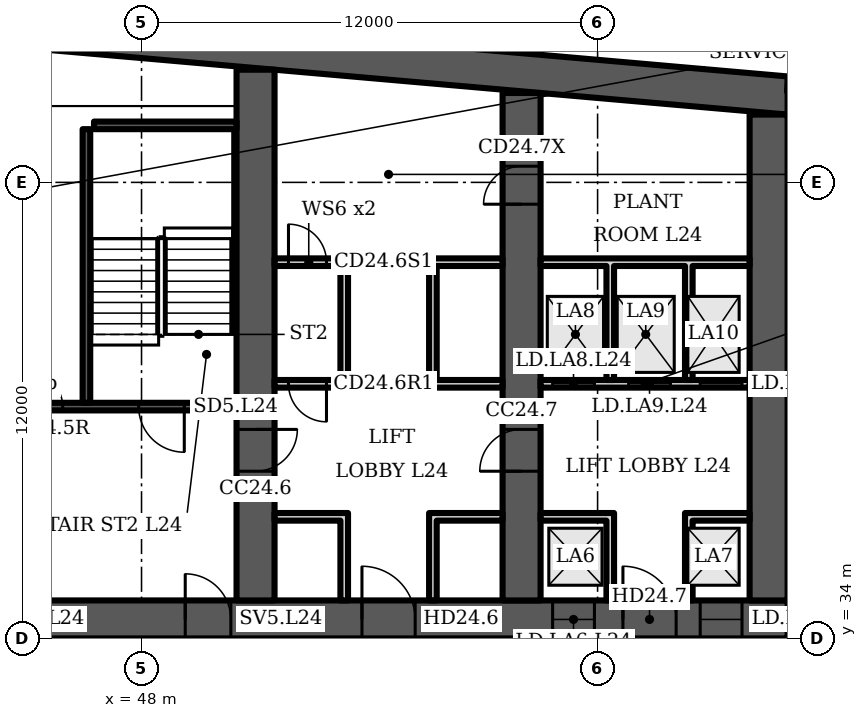
"""IFC4 building model, lengths in metres.
Left out: names, types, materials, properties, quantities, classifications, styles, units other than length and angle.
Written with IfcOpenShell. Run it as: python <this file> out.ifc"""

import sys

from ifc_helpers import new_model, si_unit, direction, frame, frame_2d, origin, place, context, subcontext, project, spatial, polyline, rectangle, outline, extrude, element, fill, save


model = new_model("IFC4")
c1 = context("Model", 3, precision=1e-05, world=origin(), true_north=direction((0.0, 1.0)))
c2 = subcontext(c1, "Body", "Model", "MODEL_VIEW")
j1 = project(units=[si_unit("LENGTHUNIT", "METRE"), si_unit("PLANEANGLEUNIT", "RADIAN")], contexts=[c1])
p1 = place(None, origin())
s1 = spatial("IfcSite", under=j1, at=p1, CompositionType="ELEMENT")
p2 = place(p1, origin())
s2 = spatial("IfcBuilding", under=s1, at=p2, CompositionType="ELEMENT")
p3 = place(p2, frame((0.0, 0.0, 107.5)))
s3 = spatial("IfcBuildingStorey", under=s2, at=p3, CompositionType="ELEMENT", Elevation=107.5)
p4 = place(p3, origin())
e1 = element("IfcWall", 1, at=p4, inside=s3, PredefinedType="SHEAR", context=c2, shape_type="SweptSolid", body=[
    extrude(outline(polyline([(16.0, 47.784), (40.5, 49.927), (65.0, 47.784), (65.0, 48.787), (40.5, 50.931), (16.0, 48.787), (16.0, 47.784)])), origin(), (0.0, 0.0, 1.0), 3.6),
])
p5 = place(p3, frame((16.0, 34.5, 0.0), z_axis=(0.0, 0.0, 1.0), x_axis=(1.0, 0.0, 0.0)))
e2 = element("IfcWall", 2, at=p5, inside=s3, PredefinedType="SHEAR", context=c2, shape_type="SweptSolid", body=[
    extrude(rectangle(XDim=49.0, YDim=1.0, at=frame_2d((24.5, 0.0))), origin(), (0.0, 0.0, 1.0), 3.6),
])
p6 = place(p5, frame((1.2, 0.0, 0.0)))
e3 = element("IfcOpeningElement", 3, at=p6, cuts=e2, PredefinedType="OPENING", context=c2, shape_type="SweptSolid", body=[
    extrude(rectangle(XDim=1.1, YDim=2.1, at=frame_2d((0.55, 1.05))), frame((0.0, 0.51, 0.0), z_axis=(0.0, -1.0, 0.0), x_axis=(1.0, 0.0, 0.0)), (0.0, 0.0, 1.0), 1.02),
])
p7 = place(p5, frame((5.083, 0.0, 0.0)))
e4 = element("IfcOpeningElement", 4, at=p7, cuts=e2, PredefinedType="OPENING", context=c2, shape_type="SweptSolid", body=[
    extrude(rectangle(XDim=1.1, YDim=2.1, at=frame_2d((0.55, 1.05))), frame((0.0, 0.51, 0.0), z_axis=(0.0, -1.0, 0.0), x_axis=(1.0, 0.0, 0.0)), (0.0, 0.0, 1.0), 1.02),
])
p8 = place(p5, frame((2.933, 0.0, 0.0)))
e5 = element("IfcOpeningElement", 5, at=p8, cuts=e2, PredefinedType="OPENING", context=c2, shape_type="SweptSolid", body=[
    extrude(rectangle(XDim=1.4, YDim=2.1, at=frame_2d((0.7, 1.05))), frame((0.0, 0.51, 0.0), z_axis=(0.0, -1.0, 0.0), x_axis=(1.0, 0.0, 0.0)), (0.0, 0.0, 1.0), 1.02),
])
p9 = place(p5, frame((7.65, 0.0, 0.0)))
e6 = element("IfcOpeningElement", 6, at=p9, cuts=e2, PredefinedType="OPENING", context=c2, shape_type="SweptSolid", body=[
    extrude(rectangle(XDim=1.2, YDim=2.1, at=frame_2d((0.6, 1.05))), frame((0.0, 0.51, 0.0), z_axis=(0.0, -1.0, 0.0), x_axis=(1.0, 0.0, 0.0)), (0.0, 0.0, 1.0), 1.02),
])
p10 = place(p5, frame((14.817, 0.0, 0.0)))
e7 = element("IfcOpeningElement", 7, at=p10, cuts=e2, PredefinedType="OPENING", context=c2, shape_type="SweptSolid", body=[
    extrude(rectangle(XDim=1.1, YDim=2.1, at=frame_2d((0.55, 1.05))), frame((0.0, 0.51, 0.0), z_axis=(0.0, -1.0, 0.0), x_axis=(1.0, 0.0, 0.0)), (0.0, 0.0, 1.0), 1.02),
])
p11 = place(p5, frame((19.083, 0.0, 0.0)))
e8 = element("IfcOpeningElement", 8, at=p11, cuts=e2, PredefinedType="OPENING", context=c2, shape_type="SweptSolid", body=[
    extrude(rectangle(XDim=1.1, YDim=2.1, at=frame_2d((0.55, 1.05))), frame((0.0, 0.51, 0.0), z_axis=(0.0, -1.0, 0.0), x_axis=(1.0, 0.0, 0.0)), (0.0, 0.0, 1.0), 1.02),
])
p12 = place(p5, frame((16.8, 0.0, 0.0)))
e9 = element("IfcOpeningElement", 9, at=p12, cuts=e2, PredefinedType="OPENING", context=c2, shape_type="SweptSolid", body=[
    extrude(rectangle(XDim=1.4, YDim=2.1, at=frame_2d((0.7, 1.05))), frame((0.0, 0.51, 0.0), z_axis=(0.0, -1.0, 0.0), x_axis=(1.0, 0.0, 0.0)), (0.0, 0.0, 1.0), 1.02),
])
p13 = place(p5, frame((21.817, 0.0, 0.0)))
e10 = element("IfcOpeningElement", 10, at=p13, cuts=e2, PredefinedType="OPENING", context=c2, shape_type="SweptSolid", body=[
    extrude(rectangle(XDim=1.1, YDim=2.1, at=frame_2d((0.55, 1.05))), frame((0.0, 0.51, 0.0), z_axis=(0.0, -1.0, 0.0), x_axis=(1.0, 0.0, 0.0)), (0.0, 0.0, 1.0), 1.02),
])
p14 = place(p5, frame((26.083, 0.0, 0.0)))
e11 = element("IfcOpeningElement", 11, at=p14, cuts=e2, PredefinedType="OPENING", context=c2, shape_type="SweptSolid", body=[
    extrude(rectangle(XDim=1.1, YDim=2.1, at=frame_2d((0.55, 1.05))), frame((0.0, 0.51, 0.0), z_axis=(0.0, -1.0, 0.0), x_axis=(1.0, 0.0, 0.0)), (0.0, 0.0, 1.0), 1.02),
])
p15 = place(p5, frame((33.15, 0.0, 0.0)))
e12 = element("IfcOpeningElement", 12, at=p15, cuts=e2, PredefinedType="OPENING", context=c2, shape_type="SweptSolid", body=[
    extrude(rectangle(XDim=1.2, YDim=2.1, at=frame_2d((0.6, 1.05))), frame((0.0, 0.51, 0.0), z_axis=(0.0, -1.0, 0.0), x_axis=(1.0, 0.0, 0.0)), (0.0, 0.0, 1.0), 1.02),
])
p16 = place(p5, frame((37.8, 0.0, 0.0)))
e13 = element("IfcOpeningElement", 13, at=p16, cuts=e2, PredefinedType="OPENING", context=c2, shape_type="SweptSolid", body=[
    extrude(rectangle(XDim=1.4, YDim=2.1, at=frame_2d((0.7, 1.05))), frame((0.0, 0.51, 0.0), z_axis=(0.0, -1.0, 0.0), x_axis=(1.0, 0.0, 0.0)), (0.0, 0.0, 1.0), 1.02),
])
p17 = place(p5, frame((42.817, 0.0, 0.0)))
e14 = element("IfcOpeningElement", 14, at=p17, cuts=e2, PredefinedType="OPENING", context=c2, shape_type="SweptSolid", body=[
    extrude(rectangle(XDim=1.1, YDim=2.1, at=frame_2d((0.55, 1.05))), frame((0.0, 0.51, 0.0), z_axis=(0.0, -1.0, 0.0), x_axis=(1.0, 0.0, 0.0)), (0.0, 0.0, 1.0), 1.02),
])
p18 = place(p5, frame((46.7, 0.0, 0.0)))
e15 = element("IfcOpeningElement", 15, at=p18, cuts=e2, PredefinedType="OPENING", context=c2, shape_type="SweptSolid", body=[
    extrude(rectangle(XDim=1.1, YDim=2.1, at=frame_2d((0.55, 1.05))), frame((0.0, 0.51, 0.0), z_axis=(0.0, -1.0, 0.0), x_axis=(1.0, 0.0, 0.0)), (0.0, 0.0, 1.0), 1.02),
])
p19 = place(p5, frame((44.667, 0.0, 0.0)))
e16 = element("IfcOpeningElement", 16, at=p19, cuts=e2, PredefinedType="OPENING", context=c2, shape_type="SweptSolid", body=[
    extrude(rectangle(XDim=1.4, YDim=2.1, at=frame_2d((0.7, 1.05))), frame((0.0, 0.51, 0.0), z_axis=(0.0, -1.0, 0.0), x_axis=(1.0, 0.0, 0.0)), (0.0, 0.0, 1.0), 1.02),
])
p20 = place(p3, frame((51.0, 35.0, 0.0), z_axis=(0.0, 0.0, 1.0), x_axis=(0.0, 1.0, 0.0)))
e17 = element("IfcWall", 17, at=p20, inside=s3, PredefinedType="SHEAR", context=c2, shape_type="SweptSolid", body=[
    extrude(rectangle(XDim=13.965, YDim=1.0, at=frame_2d((6.982, 0.0))), origin(), (0.0, 0.0, 1.0), 3.6),
])
p21 = place(p20, frame((3.4, 0.0, 0.0)))
e18 = element("IfcOpeningElement", 18, at=p21, cuts=e17, PredefinedType="OPENING", context=c2, shape_type="SweptSolid", body=[
    extrude(rectangle(XDim=1.1, YDim=2.1, at=frame_2d((0.55, 1.05))), frame((0.0, 0.51, 0.0), z_axis=(0.0, -1.0, 0.0), x_axis=(1.0, 0.0, 0.0)), (0.0, 0.0, 1.0), 1.02),
])
p22 = place(p3, frame((58.0, 35.0, 0.0), z_axis=(0.0, 0.0, 1.0), x_axis=(0.0, 1.0, 0.0)))
e19 = element("IfcWall", 19, at=p22, inside=s3, PredefinedType="SHEAR", context=c2, shape_type="SweptSolid", body=[
    extrude(rectangle(XDim=13.352, YDim=1.0, at=frame_2d((6.676, 0.0))), origin(), (0.0, 0.0, 1.0), 3.6),
])
p23 = place(p22, frame((10.426, 0.0, 0.0)))
e20 = element("IfcOpeningElement", 20, at=p23, cuts=e19, PredefinedType="OPENING", context=c2, shape_type="SweptSolid", body=[
    extrude(rectangle(XDim=1.0, YDim=2.1, at=frame_2d((0.5, 1.05))), frame((0.0, 0.51, 0.0), z_axis=(0.0, -1.0, 0.0), x_axis=(1.0, 0.0, 0.0)), (0.0, 0.0, 1.0), 1.02),
])
p24 = place(p22, frame((3.4, 0.0, 0.0)))
e21 = element("IfcOpeningElement", 21, at=p24, cuts=e19, PredefinedType="OPENING", context=c2, shape_type="SweptSolid", body=[
    extrude(rectangle(XDim=1.1, YDim=2.1, at=frame_2d((0.55, 1.05))), frame((0.0, 0.51, 0.0), z_axis=(0.0, -1.0, 0.0), x_axis=(1.0, 0.0, 0.0)), (0.0, 0.0, 1.0), 1.02),
])
p25 = place(p3, frame((64.5, 35.0, 0.0), z_axis=(0.0, 0.0, 1.0), x_axis=(0.0, 1.0, 0.0)))
e22 = element("IfcWall", 22, at=p25, inside=s3, PredefinedType="SHEAR", context=c2, shape_type="SweptSolid", body=[
    extrude(rectangle(XDim=12.784, YDim=1.0, at=frame_2d((6.392, 0.0))), origin(), (0.0, 0.0, 1.0), 3.6),
])
p26 = place(p3, frame((67.983, 48.326, 0.0), z_axis=(0.0, 0.0, 1.0), x_axis=(-0.996194, 0.087168, 0.0)))
e23 = element("IfcWall", 23, at=p26, inside=s3, PredefinedType="SOLIDWALL", context=c2, shape_type="SweptSolid", body=[
    extrude(rectangle(XDim=2.994, YDim=0.4, at=frame_2d((1.497, 0.0))), origin(), (0.0, 0.0, 1.0), 3.2),
])
p27 = place(p3, frame((44.5, 40.1, 0.0), z_axis=(0.0, 0.0, 1.0), x_axis=(1.0, 0.0, 0.0)))
e24 = element("IfcWall", 24, at=p27, inside=s3, PredefinedType="SHEAR", context=c2, shape_type="SweptSolid", body=[
    extrude(rectangle(XDim=6.0, YDim=0.2, at=frame_2d((3.0, 0.0))), origin(), (0.0, 0.0, 1.0), 3.2),
])
p28 = place(p27, frame((3.425, 0.0, 0.0)))
e25 = element("IfcOpeningElement", 25, at=p28, cuts=e24, PredefinedType="OPENING", context=c2, shape_type="SweptSolid", body=[
    extrude(rectangle(XDim=1.2, YDim=2.1, at=frame_2d((0.6, 1.05))), frame((0.0, 0.11, 0.0), z_axis=(0.0, -1.0, 0.0), x_axis=(1.0, 0.0, 0.0)), (0.0, 0.0, 1.0), 0.22),
])
p29 = place(p27, frame((0.525, 0.0, 0.0)))
e26 = element("IfcOpeningElement", 26, at=p29, cuts=e24, PredefinedType="OPENING", context=c2, shape_type="SweptSolid", body=[
    extrude(rectangle(XDim=0.9, YDim=2.1, at=frame_2d((0.45, 1.05))), frame((0.0, 0.11, 0.0), z_axis=(0.0, -1.0, 0.0), x_axis=(1.0, 0.0, 0.0)), (0.0, 0.0, 1.0), 0.22),
])
p30 = place(p3, frame((46.55, 40.2, 0.0), z_axis=(0.0, 0.0, 1.0), x_axis=(0.0, 1.0, 0.0)))
e27 = element("IfcWall", 27, at=p30, inside=s3, PredefinedType="SHEAR", context=c2, shape_type="SweptSolid", body=[
    extrude(rectangle(XDim=7.2, YDim=0.2, at=frame_2d((3.6, 0.0))), origin(), (0.0, 0.0, 1.0), 3.2),
])
p31 = place(p3, frame((46.75, 47.5, 0.0), z_axis=(0.0, 0.0, 1.0), x_axis=(1.0, 0.0, 0.0)))
e28 = element("IfcWall", 28, at=p31, inside=s3, PredefinedType="SHEAR", context=c2, shape_type="SweptSolid", body=[
    extrude(rectangle(XDim=3.75, YDim=0.2, at=frame_2d((1.875, 0.0))), origin(), (0.0, 0.0, 1.0), 3.2),
])
p32 = place(p3, frame((51.5, 40.7, 0.0), z_axis=(0.0, 0.0, 1.0), x_axis=(1.0, 0.0, 0.0)))
e29 = element("IfcWall", 29, at=p32, inside=s3, PredefinedType="PARTITIONING", context=c2, shape_type="SweptSolid", body=[
    extrude(rectangle(XDim=6.0, YDim=0.2, at=frame_2d((3.0, 0.0))), origin(), (0.0, 0.0, 1.0), 3.2),
])
p33 = place(p32, frame((0.367, 0.0, 0.0)))
e30 = element("IfcOpeningElement", 30, at=p33, cuts=e29, PredefinedType="OPENING", context=c2, shape_type="SweptSolid", body=[
    extrude(rectangle(XDim=1.0, YDim=2.1, at=frame_2d((0.5, 1.05))), frame((0.0, 0.11, 0.0), z_axis=(0.0, -1.0, 0.0), x_axis=(1.0, 0.0, 0.0)), (0.0, 0.0, 1.0), 0.22),
])
p34 = place(p3, frame((51.5, 43.9, 0.0), z_axis=(0.0, 0.0, 1.0), x_axis=(1.0, 0.0, 0.0)))
e31 = element("IfcWall", 31, at=p34, inside=s3, PredefinedType="PARTITIONING", context=c2, shape_type="SweptSolid", body=[
    extrude(rectangle(XDim=6.0, YDim=0.2, at=frame_2d((3.0, 0.0))), origin(), (0.0, 0.0, 1.0), 3.2),
])
p35 = place(p34, frame((0.367, 0.0, 0.0)))
e32 = element("IfcOpeningElement", 32, at=p35, cuts=e31, PredefinedType="OPENING", context=c2, shape_type="SweptSolid", body=[
    extrude(rectangle(XDim=1.0, YDim=2.1, at=frame_2d((0.5, 1.05))), frame((0.0, 0.11, 0.0), z_axis=(0.0, -1.0, 0.0), x_axis=(1.0, 0.0, 0.0)), (0.0, 0.0, 1.0), 0.22),
])
p36 = place(p3, frame((0.0, 0.0, -0.0)))
e33 = element("IfcWall", 33, at=p36, inside=s3, PredefinedType="PARTITIONING", context=c2, shape_type="SweptSolid", body=[
    extrude(outline(polyline([(53.233, 37.1), (51.5, 37.1), (51.5, 37.3), (53.233, 37.3), (53.433, 37.3), (53.433, 35.0), (53.233, 35.0), (53.233, 37.1)])), origin(), (0.0, 0.0, 1.0), 3.2),
])
p37 = place(p3, frame((0.0, 0.0, -0.0)))
e34 = element("IfcWall", 34, at=p37, inside=s3, PredefinedType="PARTITIONING", context=c2, shape_type="SweptSolid", body=[
    extrude(outline(polyline([(55.567, 37.3), (55.767, 37.3), (57.5, 37.3), (57.5, 37.1), (55.767, 37.1), (55.767, 35.0), (55.567, 35.0), (55.567, 37.3)])), origin(), (0.0, 0.0, 1.0), 3.2),
])
p38 = place(p3, frame((0.0, 0.0, -0.0)))
e35 = element("IfcWall", 35, at=p38, inside=s3, PredefinedType="PARTITIONING", context=c2, shape_type="SweptSolid", body=[
    extrude(outline(polyline([(53.233, 40.8), (53.233, 43.8), (53.433, 43.8), (53.433, 40.8), (53.233, 40.8)])), origin(), (0.0, 0.0, 1.0), 3.2),
])
p39 = place(p3, frame((0.0, 0.0, -0.0)))
e36 = element("IfcWall", 36, at=p39, inside=s3, PredefinedType="PARTITIONING", context=c2, shape_type="SweptSolid", body=[
    extrude(outline(polyline([(55.567, 40.8), (55.567, 43.8), (55.767, 43.8), (55.767, 40.8), (55.567, 40.8)])), origin(), (0.0, 0.0, 1.0), 3.2),
])
p40 = place(p3, frame((58.5, 40.7, 0.0), z_axis=(0.0, 0.0, 1.0), x_axis=(1.0, 0.0, 0.0)))
e37 = element("IfcWall", 37, at=p40, inside=s3, PredefinedType="PARTITIONING", context=c2, shape_type="SweptSolid", body=[
    extrude(rectangle(XDim=5.5, YDim=0.2, at=frame_2d((2.75, 0.0))), origin(), (0.0, 0.0, 1.0), 3.2),
])
p41 = place(p40, frame((0.317, 0.0, 0.0)))
e38 = element("IfcOpeningElement", 38, at=p41, cuts=e37, PredefinedType="OPENING", context=c2, shape_type="SweptSolid", body=[
    extrude(rectangle(XDim=1.1, YDim=2.1, at=frame_2d((0.55, 1.05))), frame((0.0, 0.11, 0.0), z_axis=(0.0, -1.0, 0.0), x_axis=(1.0, 0.0, 0.0)), (0.0, 0.0, 1.0), 0.22),
])
p42 = place(p40, frame((2.317, 0.0, 0.0)))
e39 = element("IfcOpeningElement", 39, at=p42, cuts=e37, PredefinedType="OPENING", context=c2, shape_type="SweptSolid", body=[
    extrude(rectangle(XDim=1.1, YDim=2.1, at=frame_2d((0.55, 1.05))), frame((0.0, 0.11, 0.0), z_axis=(0.0, -1.0, 0.0), x_axis=(1.0, 0.0, 0.0)), (0.0, 0.0, 1.0), 0.22),
])
p43 = place(p40, frame((4.2, 0.0, 0.0)))
e40 = element("IfcOpeningElement", 40, at=p43, cuts=e37, PredefinedType="OPENING", context=c2, shape_type="SweptSolid", body=[
    extrude(rectangle(XDim=1.1, YDim=2.1, at=frame_2d((0.55, 1.05))), frame((0.0, 0.11, 0.0), z_axis=(0.0, -1.0, 0.0), x_axis=(1.0, 0.0, 0.0)), (0.0, 0.0, 1.0), 0.22),
])
p44 = place(p3, frame((0.0, 0.0, -0.0)))
e41 = element("IfcWall", 41, at=p44, inside=s3, PredefinedType="PARTITIONING", context=c2, shape_type="SweptSolid", body=[
    extrude(outline(polyline([(60.233, 37.1), (58.5, 37.1), (58.5, 37.3), (60.233, 37.3), (60.433, 37.3), (60.433, 35.0), (60.233, 35.0), (60.233, 37.1)])), origin(), (0.0, 0.0, 1.0), 3.2),
])
p45 = place(p3, frame((0.0, 0.0, -0.0)))
e42 = element("IfcWall", 42, at=p45, inside=s3, PredefinedType="PARTITIONING", context=c2, shape_type="SweptSolid", body=[
    extrude(outline(polyline([(62.3, 37.3), (62.5, 37.3), (64.0, 37.3), (64.0, 37.1), (62.5, 37.1), (62.5, 35.0), (62.3, 35.0), (62.3, 37.3)])), origin(), (0.0, 0.0, 1.0), 3.2),
])
p46 = place(p3, frame((0.0, 0.0, -0.0)))
e43 = element("IfcWall", 43, at=p46, inside=s3, PredefinedType="PARTITIONING", context=c2, shape_type="SweptSolid", body=[
    extrude(outline(polyline([(60.433, 40.8), (60.233, 40.8), (60.233, 43.8), (58.5, 43.8), (58.5, 44.0), (64.0, 44.0), (64.0, 43.8), (62.5, 43.8), (62.5, 40.8), (62.3, 40.8), (62.3, 43.8), (60.433, 43.8), (60.433, 40.8)])), origin(), (0.0, 0.0, 1.0), 3.2),
])
p47 = place(p28, origin())
e44 = element("IfcDoor", 44, at=p47, inside=s3, OperationType="SINGLE_SWING_RIGHT", PredefinedType="DOOR", context=c2, shape_type="SweptSolid", body=[
    extrude(rectangle(XDim=1.2, YDim=2.1, at=frame_2d((0.6, 1.05))), frame((0.0, 0.025, 0.0), z_axis=(0.0, -1.0, 0.0), x_axis=(1.0, 0.0, 0.0)), (0.0, 0.0, 1.0), 0.05),
])
fill(e25, e44)
p48 = place(p29, origin())
e45 = element("IfcDoor", 45, at=p48, inside=s3, OperationType="SINGLE_SWING_LEFT", PredefinedType="DOOR", context=c2, shape_type="SweptSolid", body=[
    extrude(rectangle(XDim=0.9, YDim=2.1, at=frame_2d((0.45, 1.05))), frame((0.0, 0.025, 0.0), z_axis=(0.0, -1.0, 0.0), x_axis=(1.0, 0.0, 0.0)), (0.0, 0.0, 1.0), 0.05),
])
fill(e26, e45)
p49 = place(p15, origin())
e46 = element("IfcDoor", 46, at=p49, inside=s3, OperationType="SINGLE_SWING_LEFT", PredefinedType="DOOR", context=c2, shape_type="SweptSolid", body=[
    extrude(rectangle(XDim=1.2, YDim=2.1, at=frame_2d((0.6, 1.05))), frame((0.0, 0.025, 0.0), z_axis=(0.0, -1.0, 0.0), x_axis=(1.0, 0.0, 0.0)), (0.0, 0.0, 1.0), 0.05),
])
fill(e12, e46)
p50 = place(p16, origin())
e47 = element("IfcDoor", 47, at=p50, inside=s3, OperationType="DOUBLE_DOOR_SINGLE_SWING", PredefinedType="DOOR", context=c2, shape_type="SweptSolid", body=[
    extrude(rectangle(XDim=1.4, YDim=2.1, at=frame_2d((0.7, 1.05))), frame((0.0, 0.025, 0.0), z_axis=(0.0, -1.0, 0.0), x_axis=(1.0, 0.0, 0.0)), (0.0, 0.0, 1.0), 0.05),
])
fill(e13, e47)
p51 = place(p33, origin())
e48 = element("IfcDoor", 48, at=p51, inside=s3, OperationType="SINGLE_SWING_RIGHT", PredefinedType="DOOR", context=c2, shape_type="SweptSolid", body=[
    extrude(rectangle(XDim=1.0, YDim=2.1, at=frame_2d((0.5, 1.05))), frame((0.0, 0.025, 0.0), z_axis=(0.0, -1.0, 0.0), x_axis=(1.0, 0.0, 0.0)), (0.0, 0.0, 1.0), 0.05),
])
fill(e30, e48)
p52 = place(p35, origin())
e49 = element("IfcDoor", 49, at=p52, inside=s3, OperationType="SINGLE_SWING_LEFT", PredefinedType="DOOR", context=c2, shape_type="SweptSolid", body=[
    extrude(rectangle(XDim=1.0, YDim=2.1, at=frame_2d((0.5, 1.05))), frame((0.0, 0.025, 0.0), z_axis=(0.0, -1.0, 0.0), x_axis=(1.0, 0.0, 0.0)), (0.0, 0.0, 1.0), 0.05),
])
fill(e32, e49)
p53 = place(p17, origin())
e50 = element("IfcDoor", 50, at=p53, inside=s3, OperationType="DOUBLE_DOOR_SLIDING", PredefinedType="DOOR", context=c2, shape_type="SweptSolid", body=[
    extrude(rectangle(XDim=1.1, YDim=2.1, at=frame_2d((0.55, 1.05))), frame((0.0, 0.025, 0.0), z_axis=(0.0, -1.0, 0.0), x_axis=(1.0, 0.0, 0.0)), (0.0, 0.0, 1.0), 0.05),
])
fill(e14, e50)
p54 = place(p18, origin())
e51 = element("IfcDoor", 51, at=p54, inside=s3, OperationType="DOUBLE_DOOR_SLIDING", PredefinedType="DOOR", context=c2, shape_type="SweptSolid", body=[
    extrude(rectangle(XDim=1.1, YDim=2.1, at=frame_2d((0.55, 1.05))), frame((0.0, 0.025, 0.0), z_axis=(0.0, -1.0, 0.0), x_axis=(1.0, 0.0, 0.0)), (0.0, 0.0, 1.0), 0.05),
])
fill(e15, e51)
p55 = place(p19, origin())
e52 = element("IfcDoor", 52, at=p55, inside=s3, OperationType="DOUBLE_DOOR_SINGLE_SWING", PredefinedType="DOOR", context=c2, shape_type="SweptSolid", body=[
    extrude(rectangle(XDim=1.4, YDim=2.1, at=frame_2d((0.7, 1.05))), frame((0.0, 0.025, 0.0), z_axis=(0.0, -1.0, 0.0), x_axis=(1.0, 0.0, 0.0)), (0.0, 0.0, 1.0), 0.05),
])
fill(e16, e52)
p56 = place(p41, origin())
e53 = element("IfcDoor", 53, at=p56, inside=s3, OperationType="DOUBLE_DOOR_SLIDING", PredefinedType="DOOR", context=c2, shape_type="SweptSolid", body=[
    extrude(rectangle(XDim=1.1, YDim=2.1, at=frame_2d((0.55, 1.05))), frame((0.0, 0.025, 0.0), z_axis=(0.0, -1.0, 0.0), x_axis=(1.0, 0.0, 0.0)), (0.0, 0.0, 1.0), 0.05),
])
fill(e38, e53)
p57 = place(p42, origin())
e54 = element("IfcDoor", 54, at=p57, inside=s3, OperationType="DOUBLE_DOOR_SLIDING", PredefinedType="DOOR", context=c2, shape_type="SweptSolid", body=[
    extrude(rectangle(XDim=1.1, YDim=2.1, at=frame_2d((0.55, 1.05))), frame((0.0, 0.025, 0.0), z_axis=(0.0, -1.0, 0.0), x_axis=(1.0, 0.0, 0.0)), (0.0, 0.0, 1.0), 0.05),
])
fill(e39, e54)
p58 = place(p43, origin())
e55 = element("IfcDoor", 55, at=p58, inside=s3, OperationType="DOUBLE_DOOR_SLIDING", PredefinedType="DOOR", context=c2, shape_type="SweptSolid", body=[
    extrude(rectangle(XDim=1.1, YDim=2.1, at=frame_2d((0.55, 1.05))), frame((0.0, 0.025, 0.0), z_axis=(0.0, -1.0, 0.0), x_axis=(1.0, 0.0, 0.0)), (0.0, 0.0, 1.0), 0.05),
])
fill(e40, e55)
p59 = place(p23, origin())
e56 = element("IfcDoor", 56, at=p59, inside=s3, OperationType="SINGLE_SWING_LEFT", PredefinedType="DOOR", context=c2, shape_type="SweptSolid", body=[
    extrude(rectangle(XDim=1.0, YDim=2.1, at=frame_2d((0.5, 1.05))), frame((0.0, 0.5, 0.0), z_axis=(0.0, -1.0, 0.0), x_axis=(1.0, 0.0, 0.0)), (0.0, 0.0, 1.0), 1.0),
])
fill(e20, e56)
p60 = place(p21, origin())
e57 = element("IfcDoor", 57, at=p60, inside=s3, OperationType="SINGLE_SWING_RIGHT", PredefinedType="DOOR", context=c2, shape_type="SweptSolid", body=[
    extrude(rectangle(XDim=1.1, YDim=2.1, at=frame_2d((0.55, 1.05))), frame((0.0, 0.025, 0.0), z_axis=(0.0, -1.0, 0.0), x_axis=(1.0, 0.0, 0.0)), (0.0, 0.0, 1.0), 0.05),
])
fill(e18, e57)
p61 = place(p24, origin())
e58 = element("IfcDoor", 58, at=p61, inside=s3, OperationType="SINGLE_SWING_LEFT", PredefinedType="DOOR", context=c2, shape_type="SweptSolid", body=[
    extrude(rectangle(XDim=1.1, YDim=2.1, at=frame_2d((0.55, 1.05))), frame((0.0, 0.025, 0.0), z_axis=(0.0, -1.0, 0.0), x_axis=(1.0, 0.0, 0.0)), (0.0, 0.0, 1.0), 0.05),
])
fill(e21, e58)
save(model, sys.argv[1])
